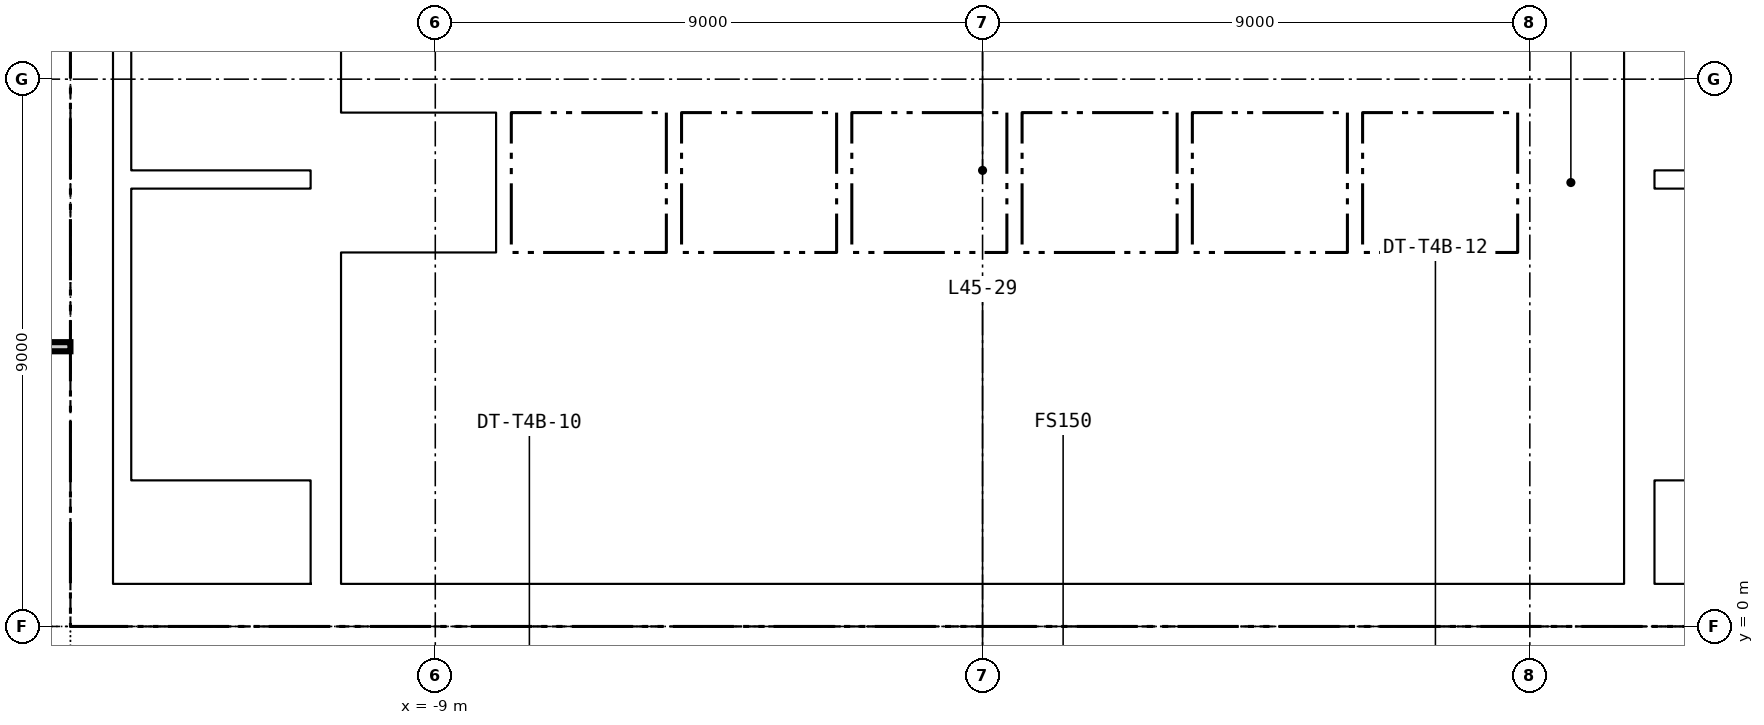
"""IFC4 building model, lengths in metres.
Left out: names, types, materials, properties, quantities, classifications, styles, units other than length and angle.
Written with IfcOpenShell. Run it as: python <this file> out.ifc"""

import sys

from ifc_helpers import new_model, si_unit, direction, frame, frame_2d, origin, place, context, subcontext, project, spatial, rectangle, extrude, element, fill, save


model = new_model("IFC4")
c1 = context("Model", 3, precision=1e-05, world=origin(), true_north=direction((0.0, 1.0)))
c2 = subcontext(c1, "Body", "Model", "MODEL_VIEW")
j1 = project(units=[si_unit("LENGTHUNIT", "METRE"), si_unit("PLANEANGLEUNIT", "RADIAN")], contexts=[c1])
p1 = place(None, origin())
s1 = spatial("IfcSite", under=j1, at=p1, CompositionType="ELEMENT")
p2 = place(p1, origin())
s2 = spatial("IfcBuilding", under=s1, at=p2, CompositionType="ELEMENT")
p3 = place(p2, frame((0.0, 0.0, 181.75)))
s3 = spatial("IfcBuildingStorey", under=s2, at=p3, CompositionType="ELEMENT", Elevation=181.75)
p4 = place(p3, frame((-15.0, 0.35, -0.15), z_axis=(0.0, 0.0, 1.0), x_axis=(1.0, 0.0, 0.0)))
e1 = element("IfcWall", 1, at=p4, inside=s3, PredefinedType="SOLIDWALL", context=c2, shape_type="SweptSolid", body=[
    extrude(rectangle(XDim=30.0, YDim=0.7, at=frame_2d((15.0, 0.0))), origin(), (0.0, 0.0, 1.0), 3.65),
])
p5 = place(p4, frame((5.8, 0.0, 0.15)))
e2 = element("IfcOpeningElement", 2, at=p5, cuts=e1, PredefinedType="OPENING", context=c2, shape_type="SweptSolid", body=[
    extrude(rectangle(XDim=2.4, YDim=2.4, at=frame_2d((1.2, 1.2))), frame((0.0, 0.36, 0.0), z_axis=(0.0, -1.0, 0.0), x_axis=(1.0, 0.0, 0.0)), (0.0, 0.0, 1.0), 0.72),
])
p6 = place(p4, frame((13.8, 0.0, 0.15)))
e3 = element("IfcOpeningElement", 3, at=p6, cuts=e1, PredefinedType="OPENING", context=c2, shape_type="SweptSolid", body=[
    extrude(rectangle(XDim=2.4, YDim=2.4, at=frame_2d((1.2, 1.2))), frame((0.0, 0.36, 0.0), z_axis=(0.0, -1.0, 0.0), x_axis=(1.0, 0.0, 0.0)), (0.0, 0.0, 1.0), 0.72),
])
p7 = place(p4, frame((21.8, 0.0, 0.15)))
e4 = element("IfcOpeningElement", 4, at=p7, cuts=e1, PredefinedType="OPENING", context=c2, shape_type="SweptSolid", body=[
    extrude(rectangle(XDim=2.4, YDim=2.4, at=frame_2d((1.2, 1.2))), frame((0.0, 0.36, 0.0), z_axis=(0.0, -1.0, 0.0), x_axis=(1.0, 0.0, 0.0)), (0.0, 0.0, 1.0), 0.72),
])
p8 = place(p4, frame((1.5, 0.0, 0.15)))
e5 = element("IfcOpeningElement", 5, at=p8, cuts=e1, PredefinedType="OPENING", context=c2, shape_type="SweptSolid", body=[
    extrude(rectangle(XDim=1.2, YDim=2.1, at=frame_2d((0.6, 1.05))), frame((0.0, 0.36, 0.0), z_axis=(0.0, -1.0, 0.0), x_axis=(1.0, 0.0, 0.0)), (0.0, 0.0, 1.0), 0.72),
])
p9 = place(p4, frame((27.3, 0.0, 0.15)))
e6 = element("IfcOpeningElement", 6, at=p9, cuts=e1, PredefinedType="OPENING", context=c2, shape_type="SweptSolid", body=[
    extrude(rectangle(XDim=1.2, YDim=2.1, at=frame_2d((0.6, 1.05))), frame((0.0, 0.36, 0.0), z_axis=(0.0, -1.0, 0.0), x_axis=(1.0, 0.0, 0.0)), (0.0, 0.0, 1.0), 0.72),
])
p10 = place(p3, frame((-14.65, 0.7, -0.15), z_axis=(0.0, 0.0, 1.0), x_axis=(0.0, 1.0, 0.0)))
e7 = element("IfcWall", 7, at=p10, inside=s3, PredefinedType="SOLIDWALL", context=c2, shape_type="SweptSolid", body=[
    extrude(rectangle(XDim=13.6, YDim=0.7, at=frame_2d((6.8, 0.0))), origin(), (0.0, 0.0, 1.0), 3.65),
])
for number, where, z_axis, x_axis in (
    (8, (-10.8, 0.7, -0.15), (0.0, 0.0, 1.0), (0.0, 1.0, 0.0)),
    (9, (10.8, 0.7, -0.15), (0.0, 0.0, 1.0), (0.0, 1.0, 0.0)),
):
    element("IfcWall", number, at=place(p3, frame(where, z_axis=z_axis, x_axis=x_axis)), inside=s3, PredefinedType="SOLIDWALL", context=c2, shape_type="SweptSolid", body=[
        extrude(rectangle(XDim=13.6, YDim=0.5, at=frame_2d((6.8, 0.0))), origin(), (0.0, 0.0, 1.0), 3.65),
    ])
p11 = place(p3, frame((-10.55, 3.5, 0.0), z_axis=(0.0, 0.0, 1.0), x_axis=(1.0, 0.0, 0.0)))
e10 = element("IfcWall", 10, at=p11, inside=s3, PredefinedType="PARTITIONING", context=c2, shape_type="SweptSolid", body=[
    extrude(rectangle(XDim=21.1, YDim=0.2, at=frame_2d((10.55, 0.0))), origin(), (0.0, 0.0, 1.0), 3.5),
])
p12 = place(p11, frame((0.663, 0.0, 0.0)))
e11 = element("IfcOpeningElement", 11, at=p12, cuts=e10, PredefinedType="OPENING", context=c2, shape_type="SweptSolid", body=[
    extrude(rectangle(XDim=1.0, YDim=2.1, at=frame_2d((0.5, 1.05))), frame((0.0, 0.11, 0.0), z_axis=(0.0, -1.0, 0.0), x_axis=(1.0, 0.0, 0.0)), (0.0, 0.0, 1.0), 0.22),
])
p13 = place(p11, frame((4.3, 0.0, 0.0)))
e12 = element("IfcOpeningElement", 12, at=p13, cuts=e10, PredefinedType="OPENING", context=c2, shape_type="SweptSolid", body=[
    extrude(rectangle(XDim=1.0, YDim=2.1, at=frame_2d((0.5, 1.05))), frame((0.0, 0.11, 0.0), z_axis=(0.0, -1.0, 0.0), x_axis=(1.0, 0.0, 0.0)), (0.0, 0.0, 1.0), 0.22),
])
p14 = place(p11, frame((9.1, 0.0, 0.0)))
e13 = element("IfcOpeningElement", 13, at=p14, cuts=e10, PredefinedType="OPENING", context=c2, shape_type="SweptSolid", body=[
    extrude(rectangle(XDim=1.0, YDim=2.1, at=frame_2d((0.5, 1.05))), frame((0.0, 0.11, 0.0), z_axis=(0.0, -1.0, 0.0), x_axis=(1.0, 0.0, 0.0)), (0.0, 0.0, 1.0), 0.22),
])
p15 = place(p11, frame((13.25, 0.0, 0.0)))
e14 = element("IfcOpeningElement", 14, at=p15, cuts=e10, PredefinedType="OPENING", context=c2, shape_type="SweptSolid", body=[
    extrude(rectangle(XDim=1.0, YDim=2.1, at=frame_2d((0.5, 1.05))), frame((0.0, 0.11, 0.0), z_axis=(0.0, -1.0, 0.0), x_axis=(1.0, 0.0, 0.0)), (0.0, 0.0, 1.0), 0.22),
])
p16 = place(p11, frame((16.962, 0.0, 0.0)))
e15 = element("IfcOpeningElement", 15, at=p16, cuts=e10, PredefinedType="OPENING", context=c2, shape_type="SweptSolid", body=[
    extrude(rectangle(XDim=1.0, YDim=2.1, at=frame_2d((0.5, 1.05))), frame((0.0, 0.11, 0.0), z_axis=(0.0, -1.0, 0.0), x_axis=(1.0, 0.0, 0.0)), (0.0, 0.0, 1.0), 0.22),
])
p17 = place(p11, frame((19.9, 0.0, 0.0)))
e16 = element("IfcOpeningElement", 16, at=p17, cuts=e10, PredefinedType="OPENING", context=c2, shape_type="SweptSolid", body=[
    extrude(rectangle(XDim=0.9, YDim=2.1, at=frame_2d((0.45, 1.05))), frame((0.0, 0.11, 0.0), z_axis=(0.0, -1.0, 0.0), x_axis=(1.0, 0.0, 0.0)), (0.0, 0.0, 1.0), 0.22),
])
p18 = place(p3, frame((-10.55, 6.025, 0.0), z_axis=(0.0, 0.0, 1.0), x_axis=(1.0, 0.0, 0.0)))
e17 = element("IfcWall", 17, at=p18, inside=s3, PredefinedType="PARTITIONING", context=c2, shape_type="SweptSolid", body=[
    extrude(rectangle(XDim=21.1, YDim=0.25, at=frame_2d((10.55, 0.0))), origin(), (0.0, 0.0, 1.0), 3.5),
])
p19 = place(p3, frame((-10.55, 8.55, 0.0), z_axis=(0.0, 0.0, 1.0), x_axis=(1.0, 0.0, 0.0)))
e18 = element("IfcWall", 18, at=p19, inside=s3, PredefinedType="PARTITIONING", context=c2, shape_type="SweptSolid", body=[
    extrude(rectangle(XDim=21.1, YDim=0.2, at=frame_2d((10.55, 0.0))), origin(), (0.0, 0.0, 1.0), 3.5),
])
p20 = place(p19, frame((0.675, 0.0, 0.0)))
e19 = element("IfcOpeningElement", 19, at=p20, cuts=e18, PredefinedType="OPENING", context=c2, shape_type="SweptSolid", body=[
    extrude(rectangle(XDim=1.2, YDim=2.1, at=frame_2d((0.6, 1.05))), frame((0.0, 0.11, 0.0), z_axis=(0.0, -1.0, 0.0), x_axis=(1.0, 0.0, 0.0)), (0.0, 0.0, 1.0), 0.22),
])
p21 = place(p19, frame((3.475, 0.0, 0.0)))
e20 = element("IfcOpeningElement", 20, at=p21, cuts=e18, PredefinedType="OPENING", context=c2, shape_type="SweptSolid", body=[
    extrude(rectangle(XDim=1.2, YDim=2.1, at=frame_2d((0.6, 1.05))), frame((0.0, 0.11, 0.0), z_axis=(0.0, -1.0, 0.0), x_axis=(1.0, 0.0, 0.0)), (0.0, 0.0, 1.0), 0.22),
])
p22 = place(p19, frame((6.275, 0.0, 0.0)))
e21 = element("IfcOpeningElement", 21, at=p22, cuts=e18, PredefinedType="OPENING", context=c2, shape_type="SweptSolid", body=[
    extrude(rectangle(XDim=1.2, YDim=2.1, at=frame_2d((0.6, 1.05))), frame((0.0, 0.11, 0.0), z_axis=(0.0, -1.0, 0.0), x_axis=(1.0, 0.0, 0.0)), (0.0, 0.0, 1.0), 0.22),
])
p23 = place(p19, frame((9.075, 0.0, 0.0)))
e22 = element("IfcOpeningElement", 22, at=p23, cuts=e18, PredefinedType="OPENING", context=c2, shape_type="SweptSolid", body=[
    extrude(rectangle(XDim=1.2, YDim=2.1, at=frame_2d((0.6, 1.05))), frame((0.0, 0.11, 0.0), z_axis=(0.0, -1.0, 0.0), x_axis=(1.0, 0.0, 0.0)), (0.0, 0.0, 1.0), 0.22),
])
p24 = place(p19, frame((11.875, 0.0, 0.0)))
e23 = element("IfcOpeningElement", 23, at=p24, cuts=e18, PredefinedType="OPENING", context=c2, shape_type="SweptSolid", body=[
    extrude(rectangle(XDim=1.2, YDim=2.1, at=frame_2d((0.6, 1.05))), frame((0.0, 0.11, 0.0), z_axis=(0.0, -1.0, 0.0), x_axis=(1.0, 0.0, 0.0)), (0.0, 0.0, 1.0), 0.22),
])
p25 = place(p19, frame((14.675, 0.0, 0.0)))
e24 = element("IfcOpeningElement", 24, at=p25, cuts=e18, PredefinedType="OPENING", context=c2, shape_type="SweptSolid", body=[
    extrude(rectangle(XDim=1.2, YDim=2.1, at=frame_2d((0.6, 1.05))), frame((0.0, 0.11, 0.0), z_axis=(0.0, -1.0, 0.0), x_axis=(1.0, 0.0, 0.0)), (0.0, 0.0, 1.0), 0.22),
])
p26 = place(p19, frame((17.475, 0.0, 0.0)))
e25 = element("IfcOpeningElement", 25, at=p26, cuts=e18, PredefinedType="OPENING", context=c2, shape_type="SweptSolid", body=[
    extrude(rectangle(XDim=1.2, YDim=2.1, at=frame_2d((0.6, 1.05))), frame((0.0, 0.11, 0.0), z_axis=(0.0, -1.0, 0.0), x_axis=(1.0, 0.0, 0.0)), (0.0, 0.0, 1.0), 0.22),
])
p27 = place(p19, frame((19.9, 0.0, 0.0)))
e26 = element("IfcOpeningElement", 26, at=p27, cuts=e18, PredefinedType="OPENING", context=c2, shape_type="SweptSolid", body=[
    extrude(rectangle(XDim=0.9, YDim=2.1, at=frame_2d((0.45, 1.05))), frame((0.0, 0.11, 0.0), z_axis=(0.0, -1.0, 0.0), x_axis=(1.0, 0.0, 0.0)), (0.0, 0.0, 1.0), 0.22),
])
p28 = place(p3, frame((-4.125, 8.65, 0.0), z_axis=(0.0, 0.0, 1.0), x_axis=(0.0, 1.0, 0.0)))
e27 = element("IfcWall", 27, at=p28, inside=s3, PredefinedType="PARTITIONING", context=c2, shape_type="SweptSolid", body=[
    extrude(rectangle(XDim=2.45, YDim=0.25, at=frame_2d((1.225, 0.0))), origin(), (0.0, 0.0, 1.0), 3.5),
])
p29 = place(p28, frame((0.625, 0.0, 0.0)))
e28 = element("IfcOpeningElement", 28, at=p29, cuts=e27, PredefinedType="OPENING", context=c2, shape_type="SweptSolid", body=[
    extrude(rectangle(XDim=1.2, YDim=2.1, at=frame_2d((0.6, 1.05))), frame((0.0, 0.135, 0.0), z_axis=(0.0, -1.0, 0.0), x_axis=(1.0, 0.0, 0.0)), (0.0, 0.0, 1.0), 0.27),
])
for number, where, z_axis, x_axis in (
    (29, (-8.15, 3.6, 0.0), (0.0, 0.0, 1.0), (0.0, 1.0, 0.0)),
    (30, (-3.35, 3.6, 0.0), (0.0, 0.0, 1.0), (0.0, 1.0, 0.0)),
    (31, (1.45, 3.6, 0.0), (0.0, 0.0, 1.0), (0.0, 1.0, 0.0)),
    (32, (4.95, 3.6, 0.0), (0.0, 0.0, 1.0), (0.0, 1.0, 0.0)),
):
    element("IfcWall", number, at=place(p3, frame(where, z_axis=z_axis, x_axis=x_axis)), inside=s3, PredefinedType="PARTITIONING", context=c2, shape_type="SweptSolid", body=[
        extrude(rectangle(XDim=2.3, YDim=0.15, at=frame_2d((1.15, 0.0))), origin(), (0.0, 0.0, 1.0), 3.5),
    ])
p30 = place(p3, frame((8.925, 3.6, 0.0), z_axis=(0.0, 0.0, 1.0), x_axis=(0.0, 1.0, 0.0)))
e33 = element("IfcWall", 33, at=p30, inside=s3, PredefinedType="PARTITIONING", context=c2, shape_type="SweptSolid", body=[
    extrude(rectangle(XDim=2.3, YDim=0.25, at=frame_2d((1.15, 0.0))), origin(), (0.0, 0.0, 1.0), 3.5),
])
for number, where, z_axis, x_axis in (
    (34, (-7.875, 6.15, 0.0), (0.0, 0.0, 1.0), (0.0, 1.0, 0.0)),
    (35, (-5.075, 6.15, 0.0), (0.0, 0.0, 1.0), (0.0, 1.0, 0.0)),
    (36, (-2.275, 6.15, 0.0), (0.0, 0.0, 1.0), (0.0, 1.0, 0.0)),
    (37, (0.525, 6.15, 0.0), (0.0, 0.0, 1.0), (0.0, 1.0, 0.0)),
    (38, (3.325, 6.15, 0.0), (0.0, 0.0, 1.0), (0.0, 1.0, 0.0)),
    (39, (6.125, 6.15, 0.0), (0.0, 0.0, 1.0), (0.0, 1.0, 0.0)),
    (40, (8.925, 6.15, 0.0), (0.0, 0.0, 1.0), (0.0, 1.0, 0.0)),
):
    element("IfcWall", number, at=place(p3, frame(where, z_axis=z_axis, x_axis=x_axis)), inside=s3, PredefinedType="PARTITIONING", context=c2, shape_type="SweptSolid", body=[
        extrude(rectangle(XDim=2.3, YDim=0.25, at=frame_2d((1.15, 0.0))), origin(), (0.0, 0.0, 1.0), 3.5),
    ])
p31 = place(p3, frame((-14.0, 7.35, 0.0), z_axis=(0.0, 0.0, 1.0), x_axis=(1.0, 0.0, 0.0)))
e41 = element("IfcWall", 41, at=p31, inside=s3, PredefinedType="SOLIDWALL", context=c2, shape_type="SweptSolid", body=[
    extrude(rectangle(XDim=2.95, YDim=0.3, at=frame_2d((1.475, 0.0))), origin(), (0.0, 0.0, 1.0), 3.5),
])
p32 = place(p3, frame((-14.15, 0.7, 0.0), z_axis=(0.0, 0.0, 1.0), x_axis=(0.0, 1.0, 0.0)))
e42 = element("IfcWall", 42, at=p32, inside=s3, PredefinedType="SOLIDWALL", context=c2, shape_type="SweptSolid", body=[
    extrude(rectangle(XDim=13.6, YDim=0.3, at=frame_2d((6.8, 0.0))), origin(), (0.0, 0.0, 1.0), 3.5),
])
p33 = place(p3, frame((11.05, 7.35, 0.0), z_axis=(0.0, 0.0, 1.0), x_axis=(1.0, 0.0, 0.0)))
e43 = element("IfcWall", 43, at=p33, inside=s3, PredefinedType="SOLIDWALL", context=c2, shape_type="SweptSolid", body=[
    extrude(rectangle(XDim=2.95, YDim=0.3, at=frame_2d((1.475, 0.0))), origin(), (0.0, 0.0, 1.0), 3.5),
])
p34 = place(p3, frame((-18.925, 4.6, 0.0), z_axis=(0.0, 0.0, 1.0), x_axis=(1.0, 0.0, 0.0)))
e44 = element("IfcWall", 44, at=p34, inside=s3, PredefinedType="PARTITIONING", context=c2, shape_type="SweptSolid", body=[
    extrude(rectangle(XDim=3.925, YDim=0.15, at=frame_2d((1.962, 0.0))), origin(), (0.0, 0.0, 1.0), 2.741),
])
p35 = place(p29, origin())
e45 = element("IfcDoor", 45, at=p35, inside=s3, OperationType="SINGLE_SWING_LEFT", PredefinedType="DOOR", context=c2, shape_type="SweptSolid", body=[
    extrude(rectangle(XDim=1.2, YDim=2.1, at=frame_2d((0.6, 1.05))), frame((0.0, 0.025, 0.0), z_axis=(0.0, -1.0, 0.0), x_axis=(1.0, 0.0, 0.0)), (0.0, 0.0, 1.0), 0.05),
])
fill(e28, e45)
p36 = place(p12, origin())
e46 = element("IfcDoor", 46, at=p36, inside=s3, OperationType="SINGLE_SWING_LEFT", PredefinedType="DOOR", context=c2, shape_type="SweptSolid", body=[
    extrude(rectangle(XDim=1.0, YDim=2.1, at=frame_2d((0.5, 1.05))), frame((0.0, 0.025, 0.0), z_axis=(0.0, -1.0, 0.0), x_axis=(1.0, 0.0, 0.0)), (0.0, 0.0, 1.0), 0.05),
])
fill(e11, e46)
p37 = place(p13, origin())
e47 = element("IfcDoor", 47, at=p37, inside=s3, OperationType="SINGLE_SWING_RIGHT", PredefinedType="DOOR", context=c2, shape_type="SweptSolid", body=[
    extrude(rectangle(XDim=1.0, YDim=2.1, at=frame_2d((0.5, 1.05))), frame((0.0, 0.025, 0.0), z_axis=(0.0, -1.0, 0.0), x_axis=(1.0, 0.0, 0.0)), (0.0, 0.0, 1.0), 0.05),
])
fill(e12, e47)
p38 = place(p14, origin())
e48 = element("IfcDoor", 48, at=p38, inside=s3, OperationType="SINGLE_SWING_LEFT", PredefinedType="DOOR", context=c2, shape_type="SweptSolid", body=[
    extrude(rectangle(XDim=1.0, YDim=2.1, at=frame_2d((0.5, 1.05))), frame((0.0, 0.025, 0.0), z_axis=(0.0, -1.0, 0.0), x_axis=(1.0, 0.0, 0.0)), (0.0, 0.0, 1.0), 0.05),
])
fill(e13, e48)
p39 = place(p15, origin())
e49 = element("IfcDoor", 49, at=p39, inside=s3, OperationType="SINGLE_SWING_RIGHT", PredefinedType="DOOR", context=c2, shape_type="SweptSolid", body=[
    extrude(rectangle(XDim=1.0, YDim=2.1, at=frame_2d((0.5, 1.05))), frame((0.0, 0.025, 0.0), z_axis=(0.0, -1.0, 0.0), x_axis=(1.0, 0.0, 0.0)), (0.0, 0.0, 1.0), 0.05),
])
fill(e14, e49)
p40 = place(p16, origin())
e50 = element("IfcDoor", 50, at=p40, inside=s3, OperationType="SINGLE_SWING_LEFT", PredefinedType="DOOR", context=c2, shape_type="SweptSolid", body=[
    extrude(rectangle(XDim=1.0, YDim=2.1, at=frame_2d((0.5, 1.05))), frame((0.0, 0.025, 0.0), z_axis=(0.0, -1.0, 0.0), x_axis=(1.0, 0.0, 0.0)), (0.0, 0.0, 1.0), 0.05),
])
fill(e15, e50)
p41 = place(p17, origin())
e51 = element("IfcDoor", 51, at=p41, inside=s3, OperationType="SINGLE_SWING_RIGHT", PredefinedType="DOOR", context=c2, shape_type="SweptSolid", body=[
    extrude(rectangle(XDim=0.9, YDim=2.1, at=frame_2d((0.45, 1.05))), frame((0.0, 0.025, 0.0), z_axis=(0.0, -1.0, 0.0), x_axis=(1.0, 0.0, 0.0)), (0.0, 0.0, 1.0), 0.05),
])
fill(e16, e51)
p42 = place(p20, origin())
e52 = element("IfcDoor", 52, at=p42, inside=s3, OperationType="DOUBLE_DOOR_SLIDING", PredefinedType="DOOR", context=c2, shape_type="SweptSolid", body=[
    extrude(rectangle(XDim=1.2, YDim=2.1, at=frame_2d((0.6, 1.05))), frame((0.0, 0.025, 0.0), z_axis=(0.0, -1.0, 0.0), x_axis=(1.0, 0.0, 0.0)), (0.0, 0.0, 1.0), 0.05),
])
fill(e19, e52)
p43 = place(p21, origin())
e53 = element("IfcDoor", 53, at=p43, inside=s3, OperationType="DOUBLE_DOOR_SLIDING", PredefinedType="DOOR", context=c2, shape_type="SweptSolid", body=[
    extrude(rectangle(XDim=1.2, YDim=2.1, at=frame_2d((0.6, 1.05))), frame((0.0, 0.025, 0.0), z_axis=(0.0, -1.0, 0.0), x_axis=(1.0, 0.0, 0.0)), (0.0, 0.0, 1.0), 0.05),
])
fill(e20, e53)
p44 = place(p22, origin())
e54 = element("IfcDoor", 54, at=p44, inside=s3, OperationType="DOUBLE_DOOR_SLIDING", PredefinedType="DOOR", context=c2, shape_type="SweptSolid", body=[
    extrude(rectangle(XDim=1.2, YDim=2.1, at=frame_2d((0.6, 1.05))), frame((0.0, 0.025, 0.0), z_axis=(0.0, -1.0, 0.0), x_axis=(1.0, 0.0, 0.0)), (0.0, 0.0, 1.0), 0.05),
])
fill(e21, e54)
p45 = place(p23, origin())
e55 = element("IfcDoor", 55, at=p45, inside=s3, OperationType="DOUBLE_DOOR_SLIDING", PredefinedType="DOOR", context=c2, shape_type="SweptSolid", body=[
    extrude(rectangle(XDim=1.2, YDim=2.1, at=frame_2d((0.6, 1.05))), frame((0.0, 0.025, 0.0), z_axis=(0.0, -1.0, 0.0), x_axis=(1.0, 0.0, 0.0)), (0.0, 0.0, 1.0), 0.05),
])
fill(e22, e55)
p46 = place(p24, origin())
e56 = element("IfcDoor", 56, at=p46, inside=s3, OperationType="DOUBLE_DOOR_SLIDING", PredefinedType="DOOR", context=c2, shape_type="SweptSolid", body=[
    extrude(rectangle(XDim=1.2, YDim=2.1, at=frame_2d((0.6, 1.05))), frame((0.0, 0.025, 0.0), z_axis=(0.0, -1.0, 0.0), x_axis=(1.0, 0.0, 0.0)), (0.0, 0.0, 1.0), 0.05),
])
fill(e23, e56)
p47 = place(p25, origin())
e57 = element("IfcDoor", 57, at=p47, inside=s3, OperationType="DOUBLE_DOOR_SLIDING", PredefinedType="DOOR", context=c2, shape_type="SweptSolid", body=[
    extrude(rectangle(XDim=1.2, YDim=2.1, at=frame_2d((0.6, 1.05))), frame((0.0, 0.025, 0.0), z_axis=(0.0, -1.0, 0.0), x_axis=(1.0, 0.0, 0.0)), (0.0, 0.0, 1.0), 0.05),
])
fill(e24, e57)
p48 = place(p26, origin())
e58 = element("IfcDoor", 58, at=p48, inside=s3, OperationType="DOUBLE_DOOR_SLIDING", PredefinedType="DOOR", context=c2, shape_type="SweptSolid", body=[
    extrude(rectangle(XDim=1.2, YDim=2.1, at=frame_2d((0.6, 1.05))), frame((0.0, 0.025, 0.0), z_axis=(0.0, -1.0, 0.0), x_axis=(1.0, 0.0, 0.0)), (0.0, 0.0, 1.0), 0.05),
])
fill(e25, e58)
p49 = place(p27, origin())
e59 = element("IfcDoor", 59, at=p49, inside=s3, OperationType="SINGLE_SWING_RIGHT", PredefinedType="DOOR", context=c2, shape_type="SweptSolid", body=[
    extrude(rectangle(XDim=0.9, YDim=2.1, at=frame_2d((0.45, 1.05))), frame((0.0, 0.025, 0.0), z_axis=(0.0, -1.0, 0.0), x_axis=(1.0, 0.0, 0.0)), (0.0, 0.0, 1.0), 0.05),
])
fill(e26, e59)
p50 = place(p5, origin())
e60 = element("IfcDoor", 60, at=p50, inside=s3, OperationType="DOUBLE_DOOR_DOUBLE_SWING", PredefinedType="DOOR", context=c2, shape_type="SweptSolid", body=[
    extrude(rectangle(XDim=2.4, YDim=2.4, at=frame_2d((1.2, 1.2))), frame((0.0, 0.025, 0.0), z_axis=(0.0, -1.0, 0.0), x_axis=(1.0, 0.0, 0.0)), (0.0, 0.0, 1.0), 0.05),
])
fill(e2, e60)
p51 = place(p6, origin())
e61 = element("IfcDoor", 61, at=p51, inside=s3, OperationType="DOUBLE_DOOR_DOUBLE_SWING", PredefinedType="DOOR", context=c2, shape_type="SweptSolid", body=[
    extrude(rectangle(XDim=2.4, YDim=2.4, at=frame_2d((1.2, 1.2))), frame((0.0, 0.025, 0.0), z_axis=(0.0, -1.0, 0.0), x_axis=(1.0, 0.0, 0.0)), (0.0, 0.0, 1.0), 0.05),
])
fill(e3, e61)
p52 = place(p7, origin())
e62 = element("IfcDoor", 62, at=p52, inside=s3, OperationType="DOUBLE_DOOR_DOUBLE_SWING", PredefinedType="DOOR", context=c2, shape_type="SweptSolid", body=[
    extrude(rectangle(XDim=2.4, YDim=2.4, at=frame_2d((1.2, 1.2))), frame((0.0, 0.025, 0.0), z_axis=(0.0, -1.0, 0.0), x_axis=(1.0, 0.0, 0.0)), (0.0, 0.0, 1.0), 0.05),
])
fill(e4, e62)
p53 = place(p8, origin())
e63 = element("IfcDoor", 63, at=p53, inside=s3, OperationType="SINGLE_SWING_LEFT", PredefinedType="DOOR", context=c2, shape_type="SweptSolid", body=[
    extrude(rectangle(XDim=1.2, YDim=2.1, at=frame_2d((0.6, 1.05))), frame((0.0, 0.025, 0.0), z_axis=(0.0, -1.0, 0.0), x_axis=(1.0, 0.0, 0.0)), (0.0, 0.0, 1.0), 0.05),
])
fill(e5, e63)
save(model, sys.argv[1])
